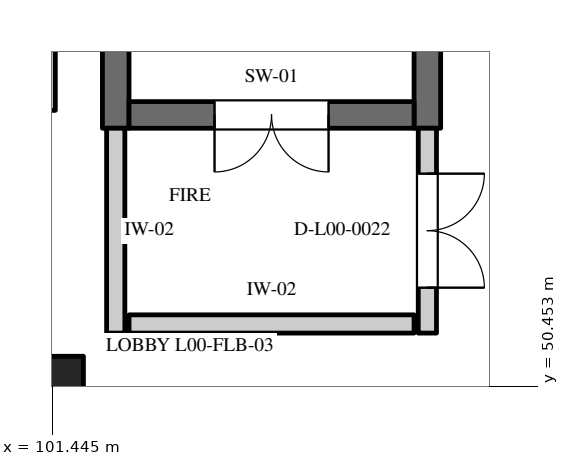
"""IFC4 building model, lengths in metres.
Left out: names, types, materials, properties, quantities, classifications, styles, units other than length and angle.
Written with IfcOpenShell. Run it as: python <this file> out.ifc"""

import sys

from ifc_helpers import new_model, si_unit, direction, frame, frame_2d, origin, origin_2d, place, context, subcontext, project, spatial, rectangle, extrude, element, fill, save


model = new_model("IFC4")
c1 = context("Model", 3, precision=1e-05, world=origin(), true_north=direction((0.0, 1.0)))
c2 = subcontext(c1, "Body", "Model", "MODEL_VIEW")
j1 = project(units=[si_unit("LENGTHUNIT", "METRE"), si_unit("PLANEANGLEUNIT", "RADIAN")], contexts=[c1])
p1 = place(None, origin())
s1 = spatial("IfcSite", under=j1, at=p1, CompositionType="ELEMENT")
p2 = place(p1, origin())
s2 = spatial("IfcBuilding", under=s1, at=p2, CompositionType="ELEMENT")
p3 = place(p2, origin())
s3 = spatial("IfcBuildingStorey", under=s2, at=p3, CompositionType="ELEMENT", Elevation=0.0)
p4 = place(p3, frame((101.4, 50.4, 0.0), z_axis=(0.0, 0.0, 1.0), x_axis=(1.0, 0.0, 0.0)))
e1 = element("IfcColumn", 1, at=p4, inside=s3, PredefinedType="COLUMN", context=c2, shape_type="SweptSolid", body=[
    extrude(rectangle(XDim=0.9, YDim=0.9, at=origin_2d()), origin(), (0.0, 0.0, 1.0), 4.8),
])
for number, where, z_axis, x_axis in (
    (2, (102.275, 53.85, 0.0), (0.0, 0.0, 1.0), (0.0, 1.0, 0.0)),
    (3, (106.375, 53.85, 0.0), (0.0, 0.0, 1.0), (0.0, 1.0, 0.0)),
):
    element("IfcWall", number, at=place(p3, frame(where, z_axis=z_axis, x_axis=x_axis)), inside=s3, PredefinedType="SHEAR", context=c2, shape_type="SweptSolid", body=[
        extrude(rectangle(XDim=10.5, YDim=0.35, at=frame_2d((5.25, 0.0))), origin(), (0.0, 0.0, 1.0), 4.8),
    ])
p5 = place(p3, frame((102.45, 54.025, 0.0), z_axis=(0.0, 0.0, 1.0), x_axis=(1.0, 0.0, 0.0)))
e4 = element("IfcWall", 4, at=p5, inside=s3, PredefinedType="SHEAR", context=c2, shape_type="SweptSolid", body=[
    extrude(rectangle(XDim=3.75, YDim=0.35, at=frame_2d((1.875, 0.0))), origin(), (0.0, 0.0, 1.0), 4.45),
])
p6 = place(p5, frame((1.125, 0.0, 0.0)))
e5 = element("IfcOpeningElement", 5, at=p6, cuts=e4, PredefinedType="OPENING", context=c2, shape_type="SweptSolid", body=[
    extrude(rectangle(XDim=1.5, YDim=2.2, at=frame_2d((0.75, 1.1))), frame((0.0, 0.187, 0.0), z_axis=(0.0, -1.0, 0.0), x_axis=(1.0, 0.0, 0.0)), (0.0, 0.0, 1.0), 0.374),
])
p7 = place(p3, frame((102.275, 51.155, 0.0), z_axis=(0.0, 0.0, 1.0), x_axis=(0.0, 1.0, 0.0)))
e6 = element("IfcWall", 6, at=p7, inside=s3, PredefinedType="STANDARD", context=c2, shape_type="SweptSolid", body=[
    extrude(rectangle(XDim=2.695, YDim=0.24, at=frame_2d((1.348, 0.0))), origin(), (0.0, 0.0, 1.0), 4.45),
])
p8 = place(p3, frame((106.375, 51.155, 0.0), z_axis=(0.0, 0.0, 1.0), x_axis=(0.0, 1.0, 0.0)))
e7 = element("IfcWall", 7, at=p8, inside=s3, PredefinedType="STANDARD", context=c2, shape_type="SweptSolid", body=[
    extrude(rectangle(XDim=2.695, YDim=0.24, at=frame_2d((1.348, 0.0))), origin(), (0.0, 0.0, 1.0), 4.45),
])
p9 = place(p8, frame((0.597, 0.0, 0.0)))
e8 = element("IfcOpeningElement", 8, at=p9, cuts=e7, PredefinedType="OPENING", context=c2, shape_type="SweptSolid", body=[
    extrude(rectangle(XDim=1.5, YDim=2.2, at=frame_2d((0.75, 1.1))), frame((0.0, 0.132, 0.0), z_axis=(0.0, -1.0, 0.0), x_axis=(1.0, 0.0, 0.0)), (0.0, 0.0, 1.0), 0.264),
])
p10 = place(p3, frame((102.45, 51.275, 0.0), z_axis=(0.0, 0.0, 1.0), x_axis=(1.0, 0.0, 0.0)))
e9 = element("IfcWall", 9, at=p10, inside=s3, PredefinedType="STANDARD", context=c2, shape_type="SweptSolid", body=[
    extrude(rectangle(XDim=3.75, YDim=0.24, at=frame_2d((1.875, 0.0))), origin(), (0.0, 0.0, 1.0), 4.45),
])
p11 = place(p3, frame((101.4, 54.085, 0.0), z_axis=(0.0, 0.0, 1.0), x_axis=(0.0, 1.0, 0.0)))
e10 = element("IfcWall", 10, at=p11, inside=s3, PredefinedType="PARTITIONING", context=c2, shape_type="SweptSolid", body=[
    extrude(rectangle(XDim=29.83, YDim=0.16, at=frame_2d((14.915, 0.0))), origin(), (0.0, 0.0, 1.0), 3.7),
])
p12 = place(p6, frame((1.5, 0.0, 0.0), z_axis=(0.0, 0.0, 1.0), x_axis=(-1.0, 0.0, 0.0)))
e11 = element("IfcDoor", 11, at=p12, inside=s3, OperationType="DOUBLE_DOOR_SINGLE_SWING", PredefinedType="DOOR", context=c2, shape_type="SweptSolid", body=[
    extrude(rectangle(XDim=1.5, YDim=2.2, at=frame_2d((0.75, 1.1))), frame((0.0, 0.025, 0.0), z_axis=(0.0, -1.0, 0.0), x_axis=(1.0, 0.0, 0.0)), (0.0, 0.0, 1.0), 0.05),
])
fill(e5, e11)
p13 = place(p9, frame((1.5, 0.0, 0.0), z_axis=(0.0, 0.0, 1.0), x_axis=(-1.0, 0.0, 0.0)))
e12 = element("IfcDoor", 12, at=p13, inside=s3, OperationType="DOUBLE_DOOR_SINGLE_SWING", PredefinedType="DOOR", context=c2, shape_type="SweptSolid", body=[
    extrude(rectangle(XDim=1.5, YDim=2.2, at=frame_2d((0.75, 1.1))), frame((0.0, 0.025, 0.0), z_axis=(0.0, -1.0, 0.0), x_axis=(1.0, 0.0, 0.0)), (0.0, 0.0, 1.0), 0.05),
])
fill(e8, e12)
save(model, sys.argv[1])
